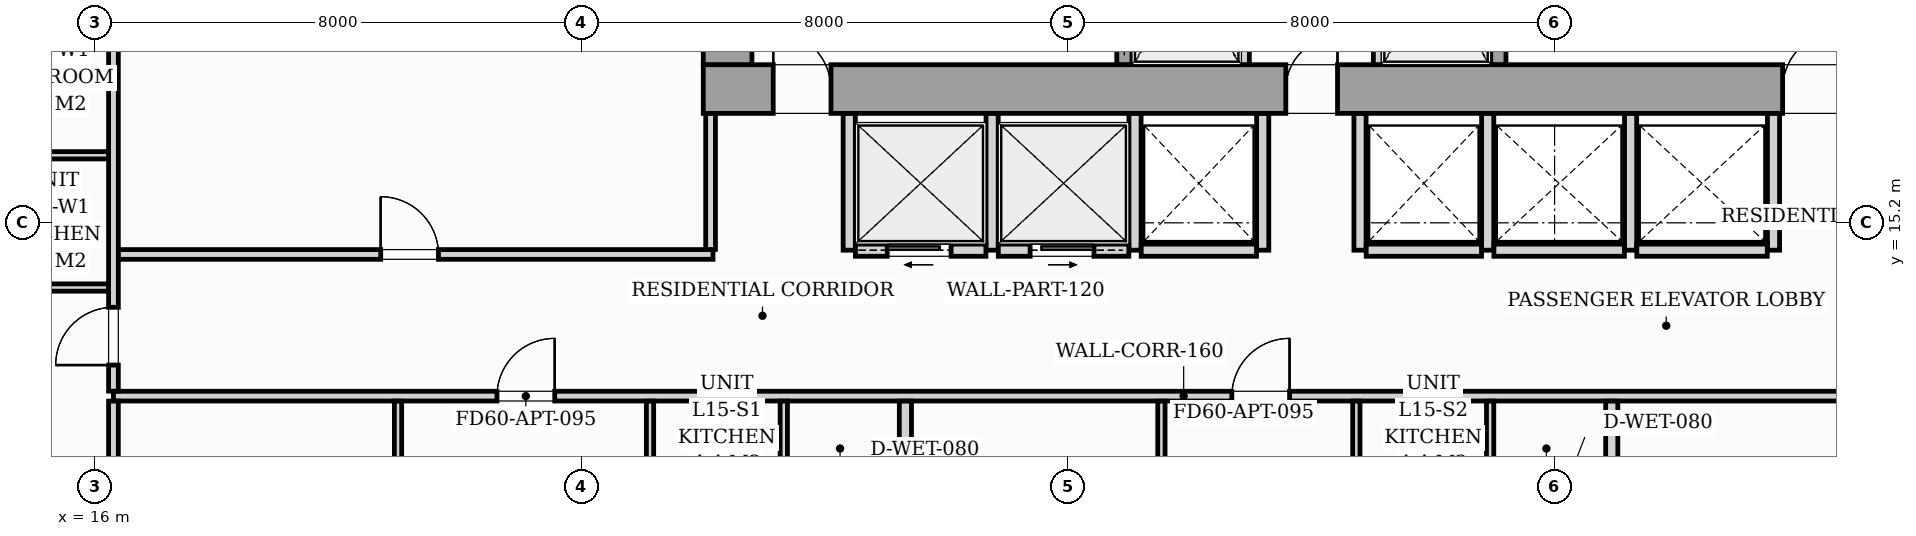
"""IFC4 building model, lengths in metres.
Left out: names, types, materials, properties, quantities, classifications, styles, units other than length and angle.
Written with IfcOpenShell. Run it as: python <this file> out.ifc"""

import sys

from ifc_helpers import new_model, si_unit, direction, frame, frame_2d, origin, origin_2d, place, context, subcontext, project, spatial, rectangle, i_section, extrude, source, transform, mapped, element, fill, save


model = new_model("IFC4")
c1 = context("Model", 3, precision=1e-05, world=origin(), true_north=direction((0.0, 1.0)))
c2 = subcontext(c1, "Body", "Model", "MODEL_VIEW")
j1 = project(units=[si_unit("LENGTHUNIT", "METRE"), si_unit("PLANEANGLEUNIT", "RADIAN")], contexts=[c1])
p1 = place(None, origin())
s1 = spatial("IfcSite", under=j1, at=p1, CompositionType="ELEMENT")
p2 = place(p1, origin())
s2 = spatial("IfcBuilding", under=s1, at=p2, CompositionType="ELEMENT")
p3 = place(p2, frame((0.0, 0.0, 55.0)))
s3 = spatial("IfcBuildingStorey", under=s2, at=p3, CompositionType="ELEMENT", Elevation=55.0)
m1 = source(origin(), c2, "Body", "SweptSolid", [
    extrude(i_section(OverallWidth=0.437, OverallDepth=0.514, WebThickness=0.061, FlangeThickness=0.097, FilletRadius=0.018, at=origin_2d()), origin(), (0.0, 0.0, 1.0), 3.196),
])
for number, where, z_axis, x_axis in (
    (1, (26.4, 17.4, 0.002), (0.0, 0.0, 1.0), (1.0, 0.0, 0.0)),
    (2, (33.12, 17.4, 0.002), (0.0, 0.0, 1.0), (1.0, 0.0, 0.0)),
    (3, (38.88, 17.4, 0.002), (0.0, 0.0, 1.0), (1.0, 0.0, 0.0)),
):
    element("IfcColumn", number, at=place(p3, frame(where, z_axis=z_axis, x_axis=x_axis)), inside=s3, PredefinedType="PILASTER", context=c2, shape_type="MappedRepresentation", body=[
        mapped(m1, transform((0.0, 0.0, 0.0), scale=1.0)),
    ])
p4 = place(p3, frame((26.0, 17.4, 0.0), z_axis=(0.0, 0.0, 1.0), x_axis=(1.0, 0.0, 0.0)))
e4 = element("IfcWall", 4, at=p4, inside=s3, PredefinedType="SHEAR", context=c2, shape_type="SweptSolid", body=[
    extrude(rectangle(XDim=20.0, YDim=0.8, at=frame_2d((10.0, 0.0))), origin(), (0.0, 0.0, 1.0), 3.2),
])
p5 = place(p4, frame((1.15, 0.0, 0.0)))
e5 = element("IfcOpeningElement", 5, at=p5, cuts=e4, PredefinedType="OPENING", context=c2, shape_type="SweptSolid", body=[
    extrude(rectangle(XDim=0.95, YDim=2.06, at=frame_2d((0.475, 1.03))), frame((0.0, 0.41, 0.0), z_axis=(0.0, -1.0, 0.0), x_axis=(1.0, 0.0, 0.0)), (0.0, 0.0, 1.0), 0.82),
])
p6 = place(p4, frame((9.58, 0.0, 0.0)))
e6 = element("IfcOpeningElement", 6, at=p6, cuts=e4, PredefinedType="OPENING", context=c2, shape_type="SweptSolid", body=[
    extrude(rectangle(XDim=0.85, YDim=2.0, at=frame_2d((0.425, 1.0))), frame((0.0, 0.41, 0.0), z_axis=(0.0, -1.0, 0.0), x_axis=(1.0, 0.0, 0.0)), (0.0, 0.0, 1.0), 0.82),
])
p7 = place(p4, frame((17.75, 0.0, 0.0)))
e7 = element("IfcOpeningElement", 7, at=p7, cuts=e4, PredefinedType="OPENING", context=c2, shape_type="SweptSolid", body=[
    extrude(rectangle(XDim=0.95, YDim=2.06, at=frame_2d((0.475, 1.03))), frame((0.0, 0.41, 0.0), z_axis=(0.0, -1.0, 0.0), x_axis=(1.0, 0.0, 0.0)), (0.0, 0.0, 1.0), 0.82),
])
p8 = place(p3, frame((26.4, 17.802, 0.0), z_axis=(0.0, 0.0, 1.0), x_axis=(0.0, 1.0, 0.0)))
e8 = element("IfcWall", 8, at=p8, inside=s3, PredefinedType="SHEAR", context=c2, shape_type="SweptSolid", body=[
    extrude(rectangle(XDim=5.796, YDim=0.8, at=frame_2d((2.898, 0.0))), origin(), (0.0, 0.0, 1.0), 3.2),
])
p9 = place(p3, frame((32.925, 17.802, 0.0), z_axis=(0.0, 0.0, 1.0), x_axis=(0.0, 1.0, 0.0)))
e9 = element("IfcWall", 9, at=p9, inside=s3, PredefinedType="SOLIDWALL", context=c2, shape_type="SweptSolid", body=[
    extrude(rectangle(XDim=2.646, YDim=0.25, at=frame_2d((1.323, 0.0))), origin(), (0.0, 0.0, 1.0), 3.2),
])
p10 = place(p9, frame((0.648, 0.0, 0.0)))
e10 = element("IfcOpeningElement", 10, at=p10, cuts=e9, PredefinedType="OPENING", context=c2, shape_type="SweptSolid", body=[
    extrude(rectangle(XDim=1.1, YDim=2.08, at=frame_2d((0.55, 1.04))), frame((0.0, 0.135, 0.0), z_axis=(0.0, -1.0, 0.0), x_axis=(1.0, 0.0, 0.0)), (0.0, 0.0, 1.0), 0.27),
])
for number, where, z_axis, x_axis in (
    (11, (34.9, 17.802, 0.0), (0.0, 0.0, 1.0), (0.0, 1.0, 0.0)),
    (12, (37.1, 17.802, 0.0), (0.0, 0.0, 1.0), (0.0, 1.0, 0.0)),
):
    element("IfcWall", number, at=place(p3, frame(where, z_axis=z_axis, x_axis=x_axis)), inside=s3, PredefinedType="PARTITIONING", context=c2, shape_type="SweptSolid", body=[
        extrude(rectangle(XDim=2.646, YDim=0.16, at=frame_2d((1.323, 0.0))), origin(), (0.0, 0.0, 1.0), 2.94),
    ])
p11 = place(p3, frame((39.075, 17.802, 0.0), z_axis=(0.0, 0.0, 1.0), x_axis=(0.0, 1.0, 0.0)))
e13 = element("IfcWall", 13, at=p11, inside=s3, PredefinedType="SOLIDWALL", context=c2, shape_type="SweptSolid", body=[
    extrude(rectangle(XDim=2.646, YDim=0.25, at=frame_2d((1.323, 0.0))), origin(), (0.0, 0.0, 1.0), 3.2),
])
p12 = place(p11, frame((0.648, 0.0, 0.0)))
e14 = element("IfcOpeningElement", 14, at=p12, cuts=e13, PredefinedType="OPENING", context=c2, shape_type="SweptSolid", body=[
    extrude(rectangle(XDim=1.1, YDim=2.08, at=frame_2d((0.55, 1.04))), frame((0.0, 0.135, 0.0), z_axis=(0.0, -1.0, 0.0), x_axis=(1.0, 0.0, 0.0)), (0.0, 0.0, 1.0), 0.27),
])
for number, where, z_axis, x_axis in (
    (15, (28.4, 14.75, 0.0), (0.0, 0.0, 1.0), (0.0, 1.0, 0.0)),
    (16, (30.75, 14.75, 0.0), (0.0, 0.0, 1.0), (0.0, 1.0, 0.0)),
    (17, (33.1, 14.75, 0.0), (0.0, 0.0, 1.0), (0.0, 1.0, 0.0)),
):
    element("IfcWall", number, at=place(p3, frame(where, z_axis=z_axis, x_axis=x_axis)), inside=s3, PredefinedType="PARTITIONING", context=c2, shape_type="SweptSolid", body=[
        extrude(rectangle(XDim=2.248, YDim=0.2, at=frame_2d((1.124, 0.0))), origin(), (0.0, 0.0, 1.0), 2.94),
    ])
p13 = place(p3, frame((28.502, 14.75, 0.0), z_axis=(0.0, 0.0, 1.0), x_axis=(1.0, 0.0, 0.0)))
e18 = element("IfcWall", 18, at=p13, inside=s3, PredefinedType="PARTITIONING", context=c2, shape_type="SweptSolid", body=[
    extrude(rectangle(XDim=2.146, YDim=0.2, at=frame_2d((1.073, 0.0))), origin(), (0.0, 0.0, 1.0), 2.94),
])
p14 = place(p13, frame((0.523, 0.0, 0.0)))
e19 = element("IfcOpeningElement", 19, at=p14, cuts=e18, PredefinedType="OPENING", context=c2, shape_type="SweptSolid", body=[
    extrude(rectangle(XDim=1.05, YDim=2.08, at=frame_2d((0.525, 1.04))), frame((0.0, 0.11, 0.0), z_axis=(0.0, -1.0, 0.0), x_axis=(1.0, 0.0, 0.0)), (0.0, 0.0, 1.0), 0.22),
])
p15 = place(p3, frame((30.852, 14.75, 0.0), z_axis=(0.0, 0.0, 1.0), x_axis=(1.0, 0.0, 0.0)))
e20 = element("IfcWall", 20, at=p15, inside=s3, PredefinedType="PARTITIONING", context=c2, shape_type="SweptSolid", body=[
    extrude(rectangle(XDim=2.146, YDim=0.2, at=frame_2d((1.073, 0.0))), origin(), (0.0, 0.0, 1.0), 2.94),
])
p16 = place(p15, frame((0.523, 0.0, 0.0)))
e21 = element("IfcOpeningElement", 21, at=p16, cuts=e20, PredefinedType="OPENING", context=c2, shape_type="SweptSolid", body=[
    extrude(rectangle(XDim=1.05, YDim=2.08, at=frame_2d((0.525, 1.04))), frame((0.0, 0.11, 0.0), z_axis=(0.0, -1.0, 0.0), x_axis=(1.0, 0.0, 0.0)), (0.0, 0.0, 1.0), 0.22),
])
p17 = place(p3, frame((35.2, 14.75, 0.0), z_axis=(0.0, 0.0, 1.0), x_axis=(0.0, 1.0, 0.0)))
e22 = element("IfcWall", 22, at=p17, inside=s3, PredefinedType="PARTITIONING", context=c2, shape_type="SweptSolid", body=[
    extrude(rectangle(XDim=2.248, YDim=0.2, at=frame_2d((1.124, 0.0))), origin(), (0.0, 0.0, 1.0), 2.94),
])
p18 = place(p3, frame((33.202, 14.75, 0.0), z_axis=(0.0, 0.0, 1.0), x_axis=(1.0, 0.0, 0.0)))
e23 = element("IfcWall", 23, at=p18, inside=s3, PredefinedType="PARTITIONING", context=c2, shape_type="SweptSolid", body=[
    extrude(rectangle(XDim=1.896, YDim=0.2, at=frame_2d((0.948, 0.0))), origin(), (0.0, 0.0, 1.0), 2.94),
])
for number, where, z_axis, x_axis in (
    (24, (36.8, 14.75, 0.0), (0.0, 0.0, 1.0), (0.0, 1.0, 0.0)),
    (25, (38.9, 14.75, 0.0), (0.0, 0.0, 1.0), (0.0, 1.0, 0.0)),
):
    element("IfcWall", number, at=place(p3, frame(where, z_axis=z_axis, x_axis=x_axis)), inside=s3, PredefinedType="PARTITIONING", context=c2, shape_type="SweptSolid", body=[
        extrude(rectangle(XDim=2.248, YDim=0.2, at=frame_2d((1.124, 0.0))), origin(), (0.0, 0.0, 1.0), 2.94),
    ])
p19 = place(p3, frame((36.902, 14.75, 0.0), z_axis=(0.0, 0.0, 1.0), x_axis=(1.0, 0.0, 0.0)))
e26 = element("IfcWall", 26, at=p19, inside=s3, PredefinedType="PARTITIONING", context=c2, shape_type="SweptSolid", body=[
    extrude(rectangle(XDim=1.896, YDim=0.2, at=frame_2d((0.948, 0.0))), origin(), (0.0, 0.0, 1.0), 2.94),
])
for number, where, z_axis, x_axis in (
    (27, (41.25, 14.75, 0.0), (0.0, 0.0, 1.0), (0.0, 1.0, 0.0)),
    (28, (43.6, 14.75, 0.0), (0.0, 0.0, 1.0), (0.0, 1.0, 0.0)),
):
    element("IfcWall", number, at=place(p3, frame(where, z_axis=z_axis, x_axis=x_axis)), inside=s3, PredefinedType="PARTITIONING", context=c2, shape_type="SweptSolid", body=[
        extrude(rectangle(XDim=2.248, YDim=0.2, at=frame_2d((1.124, 0.0))), origin(), (0.0, 0.0, 1.0), 2.94),
    ])
for number, where, z_axis, x_axis in (
    (29, (39.002, 14.75, 0.0), (0.0, 0.0, 1.0), (1.0, 0.0, 0.0)),
    (30, (41.352, 14.75, 0.0), (0.0, 0.0, 1.0), (1.0, 0.0, 0.0)),
):
    element("IfcWall", number, at=place(p3, frame(where, z_axis=z_axis, x_axis=x_axis)), inside=s3, PredefinedType="PARTITIONING", context=c2, shape_type="SweptSolid", body=[
        extrude(rectangle(XDim=2.146, YDim=0.2, at=frame_2d((1.073, 0.0))), origin(), (0.0, 0.0, 1.0), 2.94),
    ])
p20 = place(p3, frame((16.3, 12.35, 0.0), z_axis=(0.0, 0.0, 1.0), x_axis=(1.0, 0.0, 0.0)))
e31 = element("IfcWall", 31, at=p20, inside=s3, PredefinedType="PARTITIONING", context=c2, shape_type="SweptSolid", body=[
    extrude(rectangle(XDim=35.2, YDim=0.16, at=frame_2d((17.6, 0.0))), origin(), (0.0, 0.0, 1.0), 2.94),
])
p21 = place(p20, frame((6.307, 0.0, 0.0)))
e32 = element("IfcOpeningElement", 32, at=p21, cuts=e31, PredefinedType="OPENING", context=c2, shape_type="SweptSolid", body=[
    extrude(rectangle(XDim=0.95, YDim=2.06, at=frame_2d((0.475, 1.03))), frame((0.0, 0.09, 0.0), z_axis=(0.0, -1.0, 0.0), x_axis=(1.0, 0.0, 0.0)), (0.0, 0.0, 1.0), 0.18),
])
p22 = place(p20, frame((18.392, 0.0, 0.0)))
e33 = element("IfcOpeningElement", 33, at=p22, cuts=e31, PredefinedType="OPENING", context=c2, shape_type="SweptSolid", body=[
    extrude(rectangle(XDim=0.95, YDim=2.06, at=frame_2d((0.475, 1.03))), frame((0.0, 0.09, 0.0), z_axis=(0.0, -1.0, 0.0), x_axis=(1.0, 0.0, 0.0)), (0.0, 0.0, 1.0), 0.18),
])
p23 = place(p20, frame((29.304, 0.0, 0.0)))
e34 = element("IfcOpeningElement", 34, at=p23, cuts=e31, PredefinedType="OPENING", context=c2, shape_type="SweptSolid", body=[
    extrude(rectangle(XDim=0.95, YDim=2.06, at=frame_2d((0.475, 1.03))), frame((0.0, 0.09, 0.0), z_axis=(0.0, -1.0, 0.0), x_axis=(1.0, 0.0, 0.0)), (0.0, 0.0, 1.0), 0.18),
])
p24 = place(p3, frame((16.3, 2.962, 0.0), z_axis=(0.0, 0.0, 1.0), x_axis=(0.0, 1.0, 0.0)))
e35 = element("IfcWall", 35, at=p24, inside=s3, PredefinedType="PARTITIONING", context=c2, shape_type="SweptSolid", body=[
    extrude(rectangle(XDim=9.306, YDim=0.16, at=frame_2d((4.653, 0.0))), origin(), (0.0, 0.0, 1.0), 2.94),
])
p25 = place(p3, frame((16.3, 12.432, 0.0), z_axis=(0.0, 0.0, 1.0), x_axis=(0.0, 1.0, 0.0)))
e36 = element("IfcWall", 36, at=p25, inside=s3, PredefinedType="PARTITIONING", context=c2, shape_type="SweptSolid", body=[
    extrude(rectangle(XDim=15.006, YDim=0.16, at=frame_2d((7.503, 0.0))), origin(), (0.0, 0.0, 1.0), 2.94),
])
p26 = place(p25, frame((0.429, 0.0, 0.0)))
e37 = element("IfcOpeningElement", 37, at=p26, cuts=e36, PredefinedType="OPENING", context=c2, shape_type="SweptSolid", body=[
    extrude(rectangle(XDim=0.95, YDim=2.06, at=frame_2d((0.475, 1.03))), frame((0.0, 0.09, 0.0), z_axis=(0.0, -1.0, 0.0), x_axis=(1.0, 0.0, 0.0)), (0.0, 0.0, 1.0), 0.18),
])
for number, where, z_axis, x_axis in (
    (38, (25.124, 10.162, 0.0), (0.0, 0.0, 1.0), (0.0, 1.0, 0.0)),
    (39, (27.324, 10.162, 0.0), (0.0, 0.0, 1.0), (0.0, 1.0, 0.0)),
):
    element("IfcWall", number, at=place(p3, frame(where, z_axis=z_axis, x_axis=x_axis)), inside=s3, PredefinedType="PARTITIONING", context=c2, shape_type="SweptSolid", body=[
        extrude(rectangle(XDim=2.106, YDim=0.12, at=frame_2d((1.053, 0.0))), origin(), (0.0, 0.0, 1.0), 2.94),
    ])
p27 = place(p3, frame((20.98, 2.962, 0.0), z_axis=(0.0, 0.0, 1.0), x_axis=(0.0, 1.0, 0.0)))
e40 = element("IfcWall", 40, at=p27, inside=s3, PredefinedType="PARTITIONING", context=c2, shape_type="SweptSolid", body=[
    extrude(rectangle(XDim=9.306, YDim=0.12, at=frame_2d((4.653, 0.0))), origin(), (0.0, 0.0, 1.0), 2.94),
])
p28 = place(p27, frame((4.218, 0.0, 0.0)))
e41 = element("IfcOpeningElement", 41, at=p28, cuts=e40, PredefinedType="OPENING", context=c2, shape_type="SweptSolid", body=[
    extrude(rectangle(XDim=0.85, YDim=2.05, at=frame_2d((0.425, 1.025))), frame((0.0, 0.07, 0.0), z_axis=(0.0, -1.0, 0.0), x_axis=(1.0, 0.0, 0.0)), (0.0, 0.0, 1.0), 0.14),
])
p29 = place(p3, frame((29.324, 10.162, 0.0), z_axis=(0.0, 0.0, 1.0), x_axis=(0.0, 1.0, 0.0)))
e42 = element("IfcWall", 42, at=p29, inside=s3, PredefinedType="PARTITIONING", context=c2, shape_type="SweptSolid", body=[
    extrude(rectangle(XDim=2.106, YDim=0.2, at=frame_2d((1.053, 0.0))), origin(), (0.0, 0.0, 1.0), 2.94),
])
for number, where, z_axis, x_axis in (
    (43, (36.74, 10.162, 0.0), (0.0, 0.0, 1.0), (0.0, 1.0, 0.0)),
    (44, (38.94, 10.162, 0.0), (0.0, 0.0, 1.0), (0.0, 1.0, 0.0)),
):
    element("IfcWall", number, at=place(p3, frame(where, z_axis=z_axis, x_axis=x_axis)), inside=s3, PredefinedType="PARTITIONING", context=c2, shape_type="SweptSolid", body=[
        extrude(rectangle(XDim=2.106, YDim=0.12, at=frame_2d((1.053, 0.0))), origin(), (0.0, 0.0, 1.0), 2.94),
    ])
p30 = place(p3, frame((33.534, 2.78, 0.0), z_axis=(0.0, 0.0, 1.0), x_axis=(0.0, 1.0, 0.0)))
e45 = element("IfcWall", 45, at=p30, inside=s3, PredefinedType="PARTITIONING", context=c2, shape_type="SweptSolid", body=[
    extrude(rectangle(XDim=9.488, YDim=0.12, at=frame_2d((4.744, 0.0))), origin(), (0.0, 0.0, 1.0), 2.94),
])
p31 = place(p30, frame((4.4, 0.0, 0.0)))
e46 = element("IfcOpeningElement", 46, at=p31, cuts=e45, PredefinedType="OPENING", context=c2, shape_type="SweptSolid", body=[
    extrude(rectangle(XDim=0.85, YDim=2.05, at=frame_2d((0.425, 1.025))), frame((0.0, 0.07, 0.0), z_axis=(0.0, -1.0, 0.0), x_axis=(1.0, 0.0, 0.0)), (0.0, 0.0, 1.0), 0.14),
])
p32 = place(p3, frame((40.94, 10.162, 0.0), z_axis=(0.0, 0.0, 1.0), x_axis=(0.0, 1.0, 0.0)))
e47 = element("IfcWall", 47, at=p32, inside=s3, PredefinedType="PARTITIONING", context=c2, shape_type="SweptSolid", body=[
    extrude(rectangle(XDim=2.106, YDim=0.2, at=frame_2d((1.053, 0.0))), origin(), (0.0, 0.0, 1.0), 2.94),
])
p33 = place(p3, frame((13.962, 16.311, 0.0), z_axis=(0.0, 0.0, 1.0), x_axis=(1.0, 0.0, 0.0)))
e48 = element("IfcWall", 48, at=p33, inside=s3, PredefinedType="PARTITIONING", context=c2, shape_type="SweptSolid", body=[
    extrude(rectangle(XDim=2.256, YDim=0.12, at=frame_2d((1.128, 0.0))), origin(), (0.0, 0.0, 1.0), 2.045),
])
p34 = place(p3, frame((13.962, 14.136, 0.0), z_axis=(0.0, 0.0, 1.0), x_axis=(1.0, 0.0, 0.0)))
e49 = element("IfcWall", 49, at=p34, inside=s3, PredefinedType="PARTITIONING", context=c2, shape_type="SweptSolid", body=[
    extrude(rectangle(XDim=2.256, YDim=0.12, at=frame_2d((1.128, 0.0))), origin(), (0.0, 0.0, 1.0), 2.94),
])
p35 = place(p3, frame((16.382, 14.68, 0.0), z_axis=(0.0, 0.0, 1.0), x_axis=(1.0, 0.0, 0.0)))
e50 = element("IfcWall", 50, at=p35, inside=s3, PredefinedType="PARTITIONING", context=c2, shape_type="SweptSolid", body=[
    extrude(rectangle(XDim=9.778, YDim=0.16, at=frame_2d((4.889, 0.0))), origin(), (0.0, 0.0, 1.0), 2.94),
])
p36 = place(p35, frame((4.313, 0.0, 0.0)))
e51 = element("IfcOpeningElement", 51, at=p36, cuts=e50, PredefinedType="OPENING", context=c2, shape_type="SweptSolid", body=[
    extrude(rectangle(XDim=0.95, YDim=2.06, at=frame_2d((0.475, 1.03))), frame((0.0, 0.09, 0.0), z_axis=(0.0, -1.0, 0.0), x_axis=(1.0, 0.0, 0.0)), (0.0, 0.0, 1.0), 0.18),
])
p37 = place(p3, frame((26.12, 14.762, 0.0), z_axis=(0.0, 0.0, 1.0), x_axis=(0.0, 1.0, 0.0)))
e52 = element("IfcWall", 52, at=p37, inside=s3, PredefinedType="PARTITIONING", context=c2, shape_type="SweptSolid", body=[
    extrude(rectangle(XDim=2.236, YDim=0.16, at=frame_2d((1.118, 0.0))), origin(), (0.0, 0.0, 1.0), 2.94),
])
m2 = source(origin(), c2, "Body", "SweptSolid", [
    extrude(rectangle(XDim=0.95, YDim=2.06, at=frame_2d((0.475, 1.03))), frame((0.0, 0.025, 0.0), z_axis=(0.0, -1.0, 0.0), x_axis=(1.0, 0.0, 0.0)), (0.0, 0.0, 1.0), 0.05),
])
p38 = place(p5, origin())
e53 = element("IfcDoor", 53, at=p38, inside=s3, OperationType="SINGLE_SWING_LEFT", PredefinedType="DOOR", context=c2, shape_type="MappedRepresentation", body=[
    mapped(m2, transform((0.0, 0.0, 0.0), scale=1.0)),
])
fill(e5, e53)
m3 = source(origin(), c2, "Body", "SweptSolid", [
    extrude(rectangle(XDim=0.85, YDim=2.0, at=frame_2d((0.425, 1.0))), frame((0.0, 0.025, 0.0), z_axis=(0.0, -1.0, 0.0), x_axis=(1.0, 0.0, 0.0)), (0.0, 0.0, 1.0), 0.05),
])
p39 = place(p6, origin())
e54 = element("IfcDoor", 54, at=p39, inside=s3, OperationType="SINGLE_SWING_RIGHT", PredefinedType="DOOR", context=c2, shape_type="MappedRepresentation", body=[
    mapped(m3, transform((0.0, 0.0, 0.0), scale=1.0)),
])
fill(e6, e54)
p40 = place(p7, origin())
e55 = element("IfcDoor", 55, at=p40, inside=s3, OperationType="SINGLE_SWING_RIGHT", PredefinedType="DOOR", context=c2, shape_type="MappedRepresentation", body=[
    mapped(m2, transform((0.0, 0.0, 0.0), scale=1.0)),
])
fill(e7, e55)
m4 = source(origin(), c2, "Body", "SweptSolid", [
    extrude(rectangle(XDim=1.05, YDim=2.08, at=frame_2d((0.525, 1.04))), frame((0.0, 0.025, 0.0), z_axis=(0.0, -1.0, 0.0), x_axis=(1.0, 0.0, 0.0)), (0.0, 0.0, 1.0), 0.05),
])
p41 = place(p14, origin())
e56 = element("IfcDoor", 56, at=p41, inside=s3, OperationType="SLIDING_TO_LEFT", PredefinedType="DOOR", context=c2, shape_type="MappedRepresentation", body=[
    mapped(m4, transform((0.0, 0.0, 0.0), scale=1.0)),
])
fill(e19, e56)
p42 = place(p16, origin())
e57 = element("IfcDoor", 57, at=p42, inside=s3, OperationType="SLIDING_TO_RIGHT", PredefinedType="DOOR", context=c2, shape_type="MappedRepresentation", body=[
    mapped(m4, transform((0.0, 0.0, 0.0), scale=1.0)),
])
fill(e21, e57)
m5 = source(origin(), c2, "Body", "SweptSolid", [
    extrude(rectangle(XDim=0.95, YDim=2.06, at=frame_2d((0.475, 1.03))), frame((0.0, 0.025, 0.0), z_axis=(0.0, -1.0, 0.0), x_axis=(1.0, 0.0, 0.0)), (0.0, 0.0, 1.0), 0.05),
])
p43 = place(p21, origin())
e58 = element("IfcDoor", 58, at=p43, inside=s3, OperationType="SINGLE_SWING_RIGHT", PredefinedType="DOOR", context=c2, shape_type="MappedRepresentation", body=[
    mapped(m5, transform((0.0, 0.0, 0.0), scale=1.0)),
])
fill(e32, e58)
p44 = place(p22, origin())
e59 = element("IfcDoor", 59, at=p44, inside=s3, OperationType="SINGLE_SWING_RIGHT", PredefinedType="DOOR", context=c2, shape_type="MappedRepresentation", body=[
    mapped(m5, transform((0.0, 0.0, 0.0), scale=1.0)),
])
fill(e33, e59)
p45 = place(p26, origin())
e60 = element("IfcDoor", 60, at=p45, inside=s3, OperationType="SINGLE_SWING_LEFT", PredefinedType="DOOR", context=c2, shape_type="MappedRepresentation", body=[
    mapped(m5, transform((0.0, 0.0, 0.0), scale=1.0)),
])
fill(e37, e60)
p46 = place(p36, origin())
e61 = element("IfcDoor", 61, at=p46, inside=s3, OperationType="SINGLE_SWING_LEFT", PredefinedType="DOOR", context=c2, shape_type="MappedRepresentation", body=[
    mapped(m5, transform((0.0, 0.0, 0.0), scale=1.0)),
])
fill(e51, e61)
save(model, sys.argv[1])
